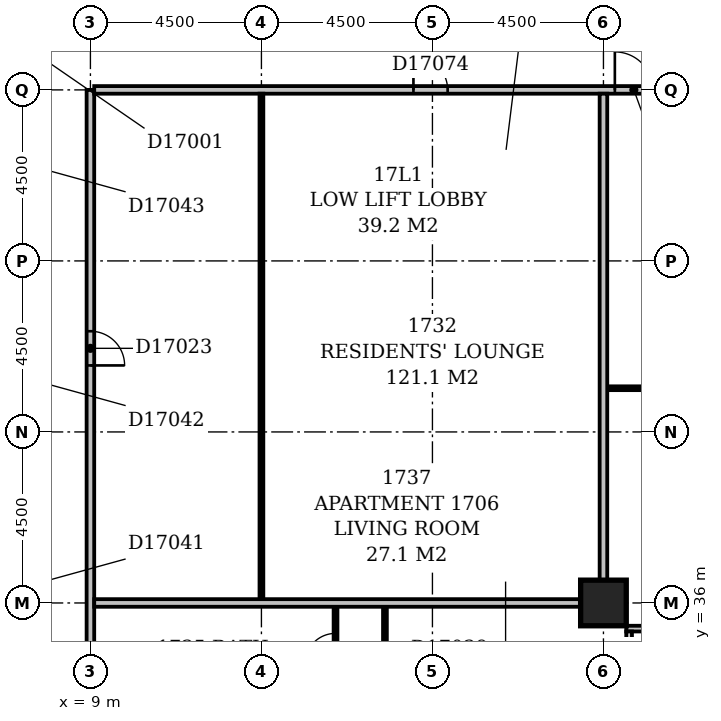
"""IFC4 building model, lengths in metres.
Left out: names, types, materials, properties, quantities, classifications, styles, units other than length and angle.
Written with IfcOpenShell. Run it as: python <this file> out.ifc"""

import sys

from ifc_helpers import new_model, si_unit, direction, frame, frame_2d, origin, origin_2d, place, context, subcontext, project, spatial, rectangle, extrude, element, fill, save


model = new_model("IFC4")
c1 = context("Model", 3, precision=1e-05, world=origin(), true_north=direction((0.0, 1.0)))
c2 = subcontext(c1, "Body", "Model", "MODEL_VIEW")
j1 = project(units=[si_unit("LENGTHUNIT", "METRE"), si_unit("PLANEANGLEUNIT", "RADIAN")], contexts=[c1])
p1 = place(None, origin())
s1 = spatial("IfcSite", under=j1, at=p1, CompositionType="ELEMENT")
p2 = place(p1, origin())
s2 = spatial("IfcBuilding", under=s1, at=p2, CompositionType="ELEMENT")
p3 = place(p2, frame((0.0, 0.0, 72.2)))
s3 = spatial("IfcBuildingStorey", under=s2, at=p3, CompositionType="ELEMENT", Elevation=72.2)
p4 = place(p3, frame((22.5, 36.0, -0.3), z_axis=(0.0, 0.0, 1.0), x_axis=(1.0, 0.0, 0.0)))
e1 = element("IfcColumn", 1, at=p4, inside=s3, PredefinedType="COLUMN", context=c2, shape_type="SweptSolid", body=[
    extrude(rectangle(XDim=1.2, YDim=1.2, at=origin_2d()), origin(), (0.0, 0.0, 1.0), 3.6),
])
p5 = place(p3, frame((23.175, 17.4, 0.0), z_axis=(0.0, 0.0, 1.0), x_axis=(0.0, 1.0, 0.0)))
e2 = element("IfcWall", 2, at=p5, inside=s3, PredefinedType="STANDARD", context=c2, shape_type="SweptSolid", body=[
    extrude(rectangle(XDim=17.85, YDim=0.15, at=frame_2d((8.925, 0.0))), origin(), (0.0, 0.0, 1.0), 2.7),
])
p6 = place(p5, frame((1.65, 0.0, 0.6)))
e3 = element("IfcOpeningElement", 3, at=p6, cuts=e2, PredefinedType="OPENING", context=c2, shape_type="SweptSolid", body=[
    extrude(rectangle(XDim=2.4, YDim=1.8, at=frame_2d((1.2, 0.9))), frame((0.0, 0.087, 0.0), z_axis=(0.0, -1.0, 0.0), x_axis=(1.0, 0.0, 0.0)), (0.0, 0.0, 1.0), 0.174),
])
p7 = place(p5, frame((6.15, 0.0, 0.6)))
e4 = element("IfcOpeningElement", 4, at=p7, cuts=e2, PredefinedType="OPENING", context=c2, shape_type="SweptSolid", body=[
    extrude(rectangle(XDim=2.4, YDim=1.8, at=frame_2d((1.2, 0.9))), frame((0.0, 0.087, 0.0), z_axis=(0.0, -1.0, 0.0), x_axis=(1.0, 0.0, 0.0)), (0.0, 0.0, 1.0), 0.174),
])
p8 = place(p5, frame((10.65, 0.0, 0.6)))
e5 = element("IfcOpeningElement", 5, at=p8, cuts=e2, PredefinedType="OPENING", context=c2, shape_type="SweptSolid", body=[
    extrude(rectangle(XDim=2.4, YDim=1.8, at=frame_2d((1.2, 0.9))), frame((0.0, 0.087, 0.0), z_axis=(0.0, -1.0, 0.0), x_axis=(1.0, 0.0, 0.0)), (0.0, 0.0, 1.0), 0.174),
])
p9 = place(p5, frame((17.13, 0.0, 0.6)))
e6 = element("IfcOpeningElement", 6, at=p9, cuts=e2, PredefinedType="OPENING", context=c2, shape_type="SweptSolid", body=[
    extrude(rectangle(XDim=0.45, YDim=1.8, at=frame_2d((0.225, 0.9))), frame((0.0, 0.087, 0.0), z_axis=(0.0, -1.0, 0.0), x_axis=(1.0, 0.0, 0.0)), (0.0, 0.0, 1.0), 0.174),
])
p10 = place(p3, frame((23.1, 35.325, 0.0), z_axis=(0.0, 0.0, 1.0), x_axis=(1.0, 0.0, 0.0)))
e7 = element("IfcWall", 7, at=p10, inside=s3, PredefinedType="STANDARD", context=c2, shape_type="SweptSolid", body=[
    extrude(rectangle(XDim=45.15, YDim=0.15, at=frame_2d((22.575, 0.0))), origin(), (0.0, 0.0, 1.0), 2.7),
])
p11 = place(p10, frame((0.45, 0.0, 0.6)))
e8 = element("IfcOpeningElement", 8, at=p11, cuts=e7, PredefinedType="OPENING", context=c2, shape_type="SweptSolid", body=[
    extrude(rectangle(XDim=2.4, YDim=1.8, at=frame_2d((1.2, 0.9))), frame((0.0, 0.087, 0.0), z_axis=(0.0, -1.0, 0.0), x_axis=(1.0, 0.0, 0.0)), (0.0, 0.0, 1.0), 0.174),
])
p12 = place(p10, frame((4.95, 0.0, 0.6)))
e9 = element("IfcOpeningElement", 9, at=p12, cuts=e7, PredefinedType="OPENING", context=c2, shape_type="SweptSolid", body=[
    extrude(rectangle(XDim=2.4, YDim=1.8, at=frame_2d((1.2, 0.9))), frame((0.0, 0.087, 0.0), z_axis=(0.0, -1.0, 0.0), x_axis=(1.0, 0.0, 0.0)), (0.0, 0.0, 1.0), 0.174),
])
p13 = place(p10, frame((9.275, 0.0, 0.6)))
e10 = element("IfcOpeningElement", 10, at=p13, cuts=e7, PredefinedType="OPENING", context=c2, shape_type="SweptSolid", body=[
    extrude(rectangle(XDim=1.5, YDim=1.8, at=frame_2d((0.75, 0.9))), frame((0.0, 0.087, 0.0), z_axis=(0.0, -1.0, 0.0), x_axis=(1.0, 0.0, 0.0)), (0.0, 0.0, 1.0), 0.174),
])
p14 = place(p10, frame((15.097, 0.0, 0.6)))
e11 = element("IfcOpeningElement", 11, at=p14, cuts=e7, PredefinedType="OPENING", context=c2, shape_type="SweptSolid", body=[
    extrude(rectangle(XDim=1.5, YDim=1.8, at=frame_2d((0.75, 0.9))), frame((0.0, 0.087, 0.0), z_axis=(0.0, -1.0, 0.0), x_axis=(1.0, 0.0, 0.0)), (0.0, 0.0, 1.0), 0.174),
])
p15 = place(p10, frame((18.45, 0.0, 0.6)))
e12 = element("IfcOpeningElement", 12, at=p15, cuts=e7, PredefinedType="OPENING", context=c2, shape_type="SweptSolid", body=[
    extrude(rectangle(XDim=2.4, YDim=1.8, at=frame_2d((1.2, 0.9))), frame((0.0, 0.087, 0.0), z_axis=(0.0, -1.0, 0.0), x_axis=(1.0, 0.0, 0.0)), (0.0, 0.0, 1.0), 0.174),
])
p16 = place(p10, frame((22.95, 0.0, 0.6)))
e13 = element("IfcOpeningElement", 13, at=p16, cuts=e7, PredefinedType="OPENING", context=c2, shape_type="SweptSolid", body=[
    extrude(rectangle(XDim=2.4, YDim=1.8, at=frame_2d((1.2, 0.9))), frame((0.0, 0.087, 0.0), z_axis=(0.0, -1.0, 0.0), x_axis=(1.0, 0.0, 0.0)), (0.0, 0.0, 1.0), 0.174),
])
p17 = place(p10, frame((27.45, 0.0, 0.6)))
e14 = element("IfcOpeningElement", 14, at=p17, cuts=e7, PredefinedType="OPENING", context=c2, shape_type="SweptSolid", body=[
    extrude(rectangle(XDim=2.4, YDim=1.8, at=frame_2d((1.2, 0.9))), frame((0.0, 0.087, 0.0), z_axis=(0.0, -1.0, 0.0), x_axis=(1.0, 0.0, 0.0)), (0.0, 0.0, 1.0), 0.174),
])
p18 = place(p10, frame((31.95, 0.0, 0.6)))
e15 = element("IfcOpeningElement", 15, at=p18, cuts=e7, PredefinedType="OPENING", context=c2, shape_type="SweptSolid", body=[
    extrude(rectangle(XDim=2.4, YDim=1.8, at=frame_2d((1.2, 0.9))), frame((0.0, 0.087, 0.0), z_axis=(0.0, -1.0, 0.0), x_axis=(1.0, 0.0, 0.0)), (0.0, 0.0, 1.0), 0.174),
])
p19 = place(p10, frame((36.45, 0.0, 0.6)))
e16 = element("IfcOpeningElement", 16, at=p19, cuts=e7, PredefinedType="OPENING", context=c2, shape_type="SweptSolid", body=[
    extrude(rectangle(XDim=2.4, YDim=1.8, at=frame_2d((1.2, 0.9))), frame((0.0, 0.087, 0.0), z_axis=(0.0, -1.0, 0.0), x_axis=(1.0, 0.0, 0.0)), (0.0, 0.0, 1.0), 0.174),
])
p20 = place(p10, frame((40.831, 0.0, 0.6)))
e17 = element("IfcOpeningElement", 17, at=p20, cuts=e7, PredefinedType="OPENING", context=c2, shape_type="SweptSolid", body=[
    extrude(rectangle(XDim=0.6, YDim=1.8, at=frame_2d((0.3, 0.9))), frame((0.0, 0.087, 0.0), z_axis=(0.0, -1.0, 0.0), x_axis=(1.0, 0.0, 0.0)), (0.0, 0.0, 1.0), 0.174),
])
p21 = place(p3, frame((9.0, 5.0, 0.0), z_axis=(0.0, 0.0, 1.0), x_axis=(0.0, 1.0, 0.0)))
e18 = element("IfcWall", 18, at=p21, inside=s3, PredefinedType="PARTITIONING", context=c2, shape_type="SweptSolid", body=[
    extrude(rectangle(XDim=44.5, YDim=0.2, at=frame_2d((22.25, 0.0))), origin(), (0.0, 0.0, 1.0), 3.3),
])
p22 = place(p21, frame((22.3, 0.0, 0.0)))
e19 = element("IfcOpeningElement", 19, at=p22, cuts=e18, PredefinedType="OPENING", context=c2, shape_type="SweptSolid", body=[
    extrude(rectangle(XDim=1.0, YDim=2.1, at=frame_2d((0.5, 1.05))), frame((0.0, 0.112, 0.0), z_axis=(0.0, -1.0, 0.0), x_axis=(1.0, 0.0, 0.0)), (0.0, 0.0, 1.0), 0.224),
])
p23 = place(p21, frame((15.7, 0.0, 0.0)))
e20 = element("IfcOpeningElement", 20, at=p23, cuts=e18, PredefinedType="OPENING", context=c2, shape_type="SweptSolid", body=[
    extrude(rectangle(XDim=1.0, YDim=2.1, at=frame_2d((0.5, 1.05))), frame((0.0, 0.112, 0.0), z_axis=(0.0, -1.0, 0.0), x_axis=(1.0, 0.0, 0.0)), (0.0, 0.0, 1.0), 0.224),
])
p24 = place(p21, frame((10.45, 0.0, 0.0)))
e21 = element("IfcOpeningElement", 21, at=p24, cuts=e18, PredefinedType="OPENING", context=c2, shape_type="SweptSolid", body=[
    extrude(rectangle(XDim=1.0, YDim=2.1, at=frame_2d((0.5, 1.05))), frame((0.0, 0.112, 0.0), z_axis=(0.0, -1.0, 0.0), x_axis=(1.0, 0.0, 0.0)), (0.0, 0.0, 1.0), 0.224),
])
p25 = place(p21, frame((5.95, 0.0, 0.0)))
e22 = element("IfcOpeningElement", 22, at=p25, cuts=e18, PredefinedType="OPENING", context=c2, shape_type="SweptSolid", body=[
    extrude(rectangle(XDim=1.0, YDim=2.1, at=frame_2d((0.5, 1.05))), frame((0.0, 0.112, 0.0), z_axis=(0.0, -1.0, 0.0), x_axis=(1.0, 0.0, 0.0)), (0.0, 0.0, 1.0), 0.224),
])
p26 = place(p21, frame((37.25, 0.0, 0.0)))
e23 = element("IfcOpeningElement", 23, at=p26, cuts=e18, PredefinedType="OPENING", context=c2, shape_type="SweptSolid", body=[
    extrude(rectangle(XDim=0.9, YDim=2.1, at=frame_2d((0.45, 1.05))), frame((0.0, 0.112, 0.0), z_axis=(0.0, -1.0, 0.0), x_axis=(1.0, 0.0, 0.0)), (0.0, 0.0, 1.0), 0.224),
])
p27 = place(p21, frame((1.5, 0.0, 0.0)))
e24 = element("IfcOpeningElement", 24, at=p27, cuts=e18, PredefinedType="OPENING", context=c2, shape_type="SweptSolid", body=[
    extrude(rectangle(XDim=0.9, YDim=2.1, at=frame_2d((0.45, 1.05))), frame((0.0, 0.112, 0.0), z_axis=(0.0, -1.0, 0.0), x_axis=(1.0, 0.0, 0.0)), (0.0, 0.0, 1.0), 0.224),
])
p28 = place(p3, frame((16.75, 27.1, 0.0), z_axis=(0.0, 0.0, 1.0), x_axis=(0.0, 1.0, 0.0)))
e25 = element("IfcWall", 25, at=p28, inside=s3, PredefinedType="PARTITIONING", context=c2, shape_type="SweptSolid", body=[
    extrude(rectangle(XDim=8.8, YDim=0.1, at=frame_2d((4.4, 0.0))), origin(), (0.0, 0.0, 1.0), 3.3),
])
p29 = place(p28, frame((1.7, 0.0, 0.0)))
e26 = element("IfcOpeningElement", 26, at=p29, cuts=e25, PredefinedType="OPENING", context=c2, shape_type="SweptSolid", body=[
    extrude(rectangle(XDim=0.9, YDim=2.1, at=frame_2d((0.45, 1.05))), frame((0.0, 0.062, 0.0), z_axis=(0.0, -1.0, 0.0), x_axis=(1.0, 0.0, 0.0)), (0.0, 0.0, 1.0), 0.124),
])
p30 = place(p28, frame((6.2, 0.0, 0.0)))
e27 = element("IfcOpeningElement", 27, at=p30, cuts=e25, PredefinedType="OPENING", context=c2, shape_type="SweptSolid", body=[
    extrude(rectangle(XDim=0.9, YDim=2.1, at=frame_2d((0.45, 1.05))), frame((0.0, 0.062, 0.0), z_axis=(0.0, -1.0, 0.0), x_axis=(1.0, 0.0, 0.0)), (0.0, 0.0, 1.0), 0.124),
])
p31 = place(p3, frame((15.45, 28.6, 0.0), z_axis=(0.0, 0.0, 1.0), x_axis=(0.0, 1.0, 0.0)))
e28 = element("IfcWall", 28, at=p31, inside=s3, PredefinedType="PARTITIONING", context=c2, shape_type="SweptSolid", body=[
    extrude(rectangle(XDim=7.3, YDim=0.1, at=frame_2d((3.65, 0.0))), origin(), (0.0, 0.0, 1.0), 3.3),
])
p32 = place(p31, frame((5.8, 0.0, 0.0)))
e29 = element("IfcOpeningElement", 29, at=p32, cuts=e28, PredefinedType="OPENING", context=c2, shape_type="SweptSolid", body=[
    extrude(rectangle(XDim=0.8, YDim=2.1, at=frame_2d((0.4, 1.05))), frame((0.0, 0.062, 0.0), z_axis=(0.0, -1.0, 0.0), x_axis=(1.0, 0.0, 0.0)), (0.0, 0.0, 1.0), 0.124),
])
p33 = place(p31, frame((2.05, 0.0, 0.0)))
e30 = element("IfcOpeningElement", 30, at=p33, cuts=e28, PredefinedType="OPENING", context=c2, shape_type="SweptSolid", body=[
    extrude(rectangle(XDim=0.9, YDim=2.1, at=frame_2d((0.45, 1.05))), frame((0.0, 0.062, 0.0), z_axis=(0.0, -1.0, 0.0), x_axis=(1.0, 0.0, 0.0)), (0.0, 0.0, 1.0), 0.124),
])
p34 = place(p3, frame((9.1, 36.0, 0.0), z_axis=(0.0, 0.0, 1.0), x_axis=(1.0, 0.0, 0.0)))
e31 = element("IfcWall", 31, at=p34, inside=s3, PredefinedType="PARTITIONING", context=c2, shape_type="SweptSolid", body=[
    extrude(rectangle(XDim=12.8, YDim=0.2, at=frame_2d((6.4, 0.0))), origin(), (0.0, 0.0, 1.0), 2.4),
])
p35 = place(p3, frame((13.5, 36.1, 0.0), z_axis=(0.0, 0.0, 1.0), x_axis=(0.0, 1.0, 0.0)))
e32 = element("IfcWall", 32, at=p35, inside=s3, PredefinedType="PARTITIONING", context=c2, shape_type="SweptSolid", body=[
    extrude(rectangle(XDim=13.3, YDim=0.1, at=frame_2d((6.65, 0.0))), origin(), (0.0, 0.0, 1.0), 3.3),
])
p36 = place(p3, frame((22.5, 36.6, 0.0), z_axis=(0.0, 0.0, 1.0), x_axis=(0.0, 1.0, 0.0)))
e33 = element("IfcWall", 33, at=p36, inside=s3, PredefinedType="PARTITIONING", context=c2, shape_type="SweptSolid", body=[
    extrude(rectangle(XDim=12.8, YDim=0.2, at=frame_2d((6.4, 0.0))), origin(), (0.0, 0.0, 1.0), 3.3),
])
p37 = place(p3, frame((22.6, 41.65, 0.0), z_axis=(0.0, 0.0, 1.0), x_axis=(1.0, 0.0, 0.0)))
e34 = element("IfcWall", 34, at=p37, inside=s3, PredefinedType="PARTITIONING", context=c2, shape_type="SweptSolid", body=[
    extrude(rectangle(XDim=13.3, YDim=0.1, at=frame_2d((6.65, 0.0))), origin(), (0.0, 0.0, 1.0), 3.3),
])
p38 = place(p37, frame((1.7, 0.0, 0.0)))
e35 = element("IfcOpeningElement", 35, at=p38, cuts=e34, PredefinedType="OPENING", context=c2, shape_type="SweptSolid", body=[
    extrude(rectangle(XDim=0.9, YDim=2.1, at=frame_2d((0.45, 1.05))), frame((0.0, 0.062, 0.0), z_axis=(0.0, -1.0, 0.0), x_axis=(1.0, 0.0, 0.0)), (0.0, 0.0, 1.0), 0.124),
])
p39 = place(p37, frame((6.2, 0.0, 0.0)))
e36 = element("IfcOpeningElement", 36, at=p39, cuts=e34, PredefinedType="OPENING", context=c2, shape_type="SweptSolid", body=[
    extrude(rectangle(XDim=0.9, YDim=2.1, at=frame_2d((0.45, 1.05))), frame((0.0, 0.062, 0.0), z_axis=(0.0, -1.0, 0.0), x_axis=(1.0, 0.0, 0.0)), (0.0, 0.0, 1.0), 0.124),
])
p40 = place(p37, frame((10.7, 0.0, 0.0)))
e37 = element("IfcOpeningElement", 37, at=p40, cuts=e34, PredefinedType="OPENING", context=c2, shape_type="SweptSolid", body=[
    extrude(rectangle(XDim=0.9, YDim=2.1, at=frame_2d((0.45, 1.05))), frame((0.0, 0.062, 0.0), z_axis=(0.0, -1.0, 0.0), x_axis=(1.0, 0.0, 0.0)), (0.0, 0.0, 1.0), 0.124),
])
p41 = place(p3, frame((9.1, 49.5, 0.0), z_axis=(0.0, 0.0, 1.0), x_axis=(1.0, 0.0, 0.0)))
e38 = element("IfcWall", 38, at=p41, inside=s3, PredefinedType="PARTITIONING", context=c2, shape_type="SweptSolid", body=[
    extrude(rectangle(XDim=57.8, YDim=0.2, at=frame_2d((28.9, 0.0))), origin(), (0.0, 0.0, 1.0), 3.3),
])
p42 = place(p41, frame((13.7, 0.0, 0.0)))
e39 = element("IfcOpeningElement", 39, at=p42, cuts=e38, PredefinedType="OPENING", context=c2, shape_type="SweptSolid", body=[
    extrude(rectangle(XDim=1.0, YDim=2.1, at=frame_2d((0.5, 1.05))), frame((0.0, 0.112, 0.0), z_axis=(0.0, -1.0, 0.0), x_axis=(1.0, 0.0, 0.0)), (0.0, 0.0, 1.0), 0.224),
])
p43 = place(p41, frame((32.2, 0.0, 0.0)))
e40 = element("IfcOpeningElement", 40, at=p43, cuts=e38, PredefinedType="OPENING", context=c2, shape_type="SweptSolid", body=[
    extrude(rectangle(XDim=1.0, YDim=2.1, at=frame_2d((0.5, 1.05))), frame((0.0, 0.112, 0.0), z_axis=(0.0, -1.0, 0.0), x_axis=(1.0, 0.0, 0.0)), (0.0, 0.0, 1.0), 0.224),
])
p44 = place(p41, frame((37.85, 0.0, 0.0)))
e41 = element("IfcOpeningElement", 41, at=p44, cuts=e38, PredefinedType="OPENING", context=c2, shape_type="SweptSolid", body=[
    extrude(rectangle(XDim=1.0, YDim=2.1, at=frame_2d((0.5, 1.05))), frame((0.0, 0.112, 0.0), z_axis=(0.0, -1.0, 0.0), x_axis=(1.0, 0.0, 0.0)), (0.0, 0.0, 1.0), 0.224),
])
p45 = place(p41, frame((45.7, 0.0, 0.0)))
e42 = element("IfcOpeningElement", 42, at=p45, cuts=e38, PredefinedType="OPENING", context=c2, shape_type="SweptSolid", body=[
    extrude(rectangle(XDim=1.0, YDim=2.1, at=frame_2d((0.5, 1.05))), frame((0.0, 0.112, 0.0), z_axis=(0.0, -1.0, 0.0), x_axis=(1.0, 0.0, 0.0)), (0.0, 0.0, 1.0), 0.224),
])
p46 = place(p41, frame((49.7, 0.0, 0.0)))
e43 = element("IfcOpeningElement", 43, at=p46, cuts=e38, PredefinedType="OPENING", context=c2, shape_type="SweptSolid", body=[
    extrude(rectangle(XDim=1.0, YDim=2.1, at=frame_2d((0.5, 1.05))), frame((0.0, 0.112, 0.0), z_axis=(0.0, -1.0, 0.0), x_axis=(1.0, 0.0, 0.0)), (0.0, 0.0, 1.0), 0.224),
])
p47 = place(p41, frame((8.4, 0.0, 0.0)))
e44 = element("IfcOpeningElement", 44, at=p47, cuts=e38, PredefinedType="OPENING", context=c2, shape_type="SweptSolid", body=[
    extrude(rectangle(XDim=0.9, YDim=2.1, at=frame_2d((0.45, 1.05))), frame((0.0, 0.112, 0.0), z_axis=(0.0, -1.0, 0.0), x_axis=(1.0, 0.0, 0.0)), (0.0, 0.0, 1.0), 0.224),
])
p48 = place(p26, frame((0.9, 0.0, 0.0), z_axis=(0.0, 0.0, 1.0), x_axis=(-1.0, 0.0, 0.0)))
e45 = element("IfcDoor", 45, at=p48, inside=s3, OperationType="SINGLE_SWING_RIGHT", PredefinedType="DOOR", context=c2, shape_type="SweptSolid", body=[
    extrude(rectangle(XDim=0.9, YDim=2.1, at=frame_2d((0.45, 1.05))), frame((0.0, 0.025, 0.0), z_axis=(0.0, -1.0, 0.0), x_axis=(1.0, 0.0, 0.0)), (0.0, 0.0, 1.0), 0.05),
])
fill(e23, e45)
p49 = place(p32, origin())
e46 = element("IfcDoor", 46, at=p49, inside=s3, OperationType="SINGLE_SWING_LEFT", PredefinedType="DOOR", context=c2, shape_type="SweptSolid", body=[
    extrude(rectangle(XDim=0.8, YDim=2.1, at=frame_2d((0.4, 1.05))), frame((0.0, 0.025, 0.0), z_axis=(0.0, -1.0, 0.0), x_axis=(1.0, 0.0, 0.0)), (0.0, 0.0, 1.0), 0.05),
])
fill(e29, e46)
p50 = place(p42, origin())
e47 = element("IfcDoor", 47, at=p50, inside=s3, OperationType="SINGLE_SWING_LEFT", PredefinedType="DOOR", context=c2, shape_type="SweptSolid", body=[
    extrude(rectangle(XDim=1.0, YDim=2.1, at=frame_2d((0.5, 1.05))), frame((0.0, 0.025, 0.0), z_axis=(0.0, -1.0, 0.0), x_axis=(1.0, 0.0, 0.0)), (0.0, 0.0, 1.0), 0.05),
])
fill(e39, e47)
p51 = place(p47, origin())
e48 = element("IfcDoor", 48, at=p51, inside=s3, OperationType="SINGLE_SWING_LEFT", PredefinedType="DOOR", context=c2, shape_type="SweptSolid", body=[
    extrude(rectangle(XDim=0.9, YDim=2.1, at=frame_2d((0.45, 1.05))), frame((0.0, 0.025, 0.0), z_axis=(0.0, -1.0, 0.0), x_axis=(1.0, 0.0, 0.0)), (0.0, 0.0, 1.0), 0.05),
])
fill(e44, e48)
save(model, sys.argv[1])
